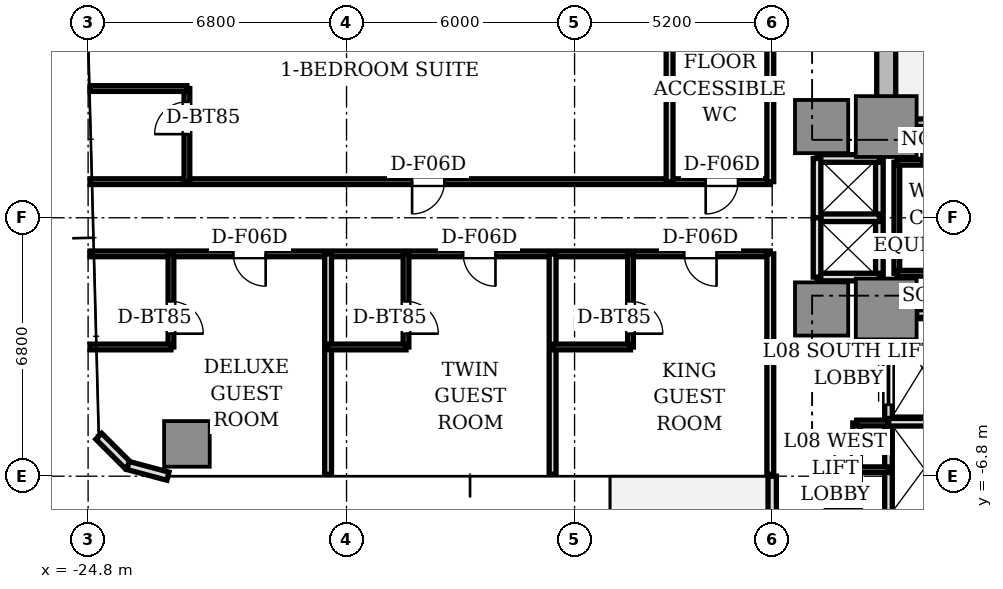
"""IFC4 building model, lengths in metres.
Left out: names, types, materials, properties, quantities, classifications, styles, units other than length and angle.
Written with IfcOpenShell. Run it as: python <this file> out.ifc"""

import sys

from ifc_helpers import new_model, si_unit, direction, frame, frame_2d, origin, origin_2d, place, context, subcontext, project, spatial, rectangle, extrude, source, transform, mapped, element, fill, save


model = new_model("IFC4")
c1 = context("Model", 3, precision=1e-05, world=origin(), true_north=direction((0.0, 1.0)))
c2 = subcontext(c1, "Body", "Model", "MODEL_VIEW")
j1 = project(units=[si_unit("LENGTHUNIT", "METRE"), si_unit("PLANEANGLEUNIT", "RADIAN")], contexts=[c1])
p1 = place(None, origin())
s1 = spatial("IfcSite", under=j1, at=p1, CompositionType="ELEMENT")
p2 = place(p1, origin())
s2 = spatial("IfcBuilding", under=s1, at=p2, CompositionType="ELEMENT")
p3 = place(p2, frame((0.0, 0.0, 33.15)))
s3 = spatial("IfcBuildingStorey", under=s2, at=p3, CompositionType="ELEMENT", Elevation=33.15)
p4 = place(p3, frame((-3.8, 2.85, 0.0), z_axis=(0.0, 0.0, 1.0), x_axis=(0.0, 1.0, 0.0)))
e1 = element("IfcWall", 1, at=p4, inside=s3, PredefinedType="SHEAR", context=c2, shape_type="SweptSolid", body=[
    extrude(rectangle(XDim=6.9, YDim=0.5, at=frame_2d((3.45, 0.0))), origin(), (0.0, 0.0, 1.0), 3.11),
])
m1 = source(origin(), c2, "Body", "SweptSolid", [
    extrude(rectangle(XDim=1.6, YDim=1.6, at=origin_2d()), origin(), (0.0, 0.0, 1.0), 3.11),
])
for number, where, z_axis, x_axis in (
    (2, (-3.8, 2.4, 0.0), (0.0, 0.0, 1.0), (1.0, 0.0, 0.0)),
    (3, (-3.8, -2.4, 0.0), (0.0, 0.0, 1.0), (1.0, 0.0, 0.0)),
):
    element("IfcColumn", number, at=place(p3, frame(where, z_axis=z_axis, x_axis=x_axis)), inside=s3, PredefinedType="COLUMN", context=c2, shape_type="MappedRepresentation", body=[
        mapped(m1, transform((0.0, 0.0, 0.0), scale=1.0)),
    ])
m2 = source(origin(), c2, "Body", "SweptSolid", [
    extrude(rectangle(XDim=1.4, YDim=1.4, at=origin_2d()), origin(), (0.0, 0.0, 1.0), 3.11),
])
for number, where, z_axis, x_axis in (
    (4, (-5.5, 2.4, 0.0), (0.0, 0.0, 1.0), (1.0, 0.0, 0.0)),
    (5, (-5.5, -2.4, 0.0), (0.0, 0.0, 1.0), (1.0, 0.0, 0.0)),
):
    element("IfcColumn", number, at=place(p3, frame(where, z_axis=z_axis, x_axis=x_axis)), inside=s3, PredefinedType="COLUMN", context=c2, shape_type="MappedRepresentation", body=[
        mapped(m2, transform((0.0, 0.0, 0.0), scale=1.0)),
    ])
m3 = source(origin(), c2, "Body", "SweptSolid", [
    extrude(rectangle(XDim=1.2, YDim=1.2, at=origin_2d()), origin(), (0.0, 0.0, 1.0), 3.11),
])
p5 = place(p3, frame((-22.2, -5.95, 0.0), z_axis=(0.0, 0.0, 1.0), x_axis=(1.0, 0.0, 0.0)))
e6 = element("IfcColumn", 6, at=p5, inside=s3, PredefinedType="COLUMN", context=c2, shape_type="MappedRepresentation", body=[
    mapped(m3, transform((0.0, 0.0, 0.0), scale=1.0)),
])
for number, where, z_axis, x_axis in (
    (7, (-24.519, -5.75, 0.0), (0.0, 0.0, 1.0), (0.707, -0.707, 0.0)),
    (8, (-23.75, -6.519, 0.0), (0.0, 0.0, 1.0), (0.966, -0.259, 0.0)),
):
    element("IfcWall", number, at=place(p3, frame(where, z_axis=z_axis, x_axis=x_axis)), inside=s3, PredefinedType="STANDARD", context=c2, shape_type="SweptSolid", body=[
        extrude(rectangle(XDim=1.087, YDim=0.22, at=frame_2d((0.543, 0.0))), origin(), (0.0, 0.0, 1.0), 3.11),
    ])
p6 = place(p3, frame((-6.8, -6.8, 0.0), z_axis=(0.0, 0.0, 1.0), x_axis=(0.0, -1.0, 0.0)))
e9 = element("IfcWall", 9, at=p6, inside=s3, PredefinedType="STANDARD", context=c2, shape_type="SweptSolid", body=[
    extrude(rectangle(XDim=2.7, YDim=0.22, at=frame_2d((1.35, 0.0))), origin(), (0.0, 0.0, 1.0), 3.11),
])
p7 = place(p6, frame((1.4, 0.0, 0.0)))
e10 = element("IfcOpeningElement", 10, at=p7, cuts=e9, PredefinedType="OPENING", context=c2, shape_type="SweptSolid", body=[
    extrude(rectangle(XDim=1.0, YDim=2.2, at=frame_2d((0.5, 1.1))), frame((0.0, 0.12, 0.0), z_axis=(0.0, -1.0, 0.0), x_axis=(1.0, 0.0, 0.0)), (0.0, 0.0, 1.0), 0.24),
])
p8 = place(p3, frame((-3.72, 2.5, 0.0), z_axis=(0.0, 0.0, 1.0), x_axis=(1.0, 0.0, 0.0)))
e11 = element("IfcWall", 11, at=p8, inside=s3, PredefinedType="SOLIDWALL", context=c2, shape_type="SweptSolid", body=[
    extrude(rectangle(XDim=3.72, YDim=0.2, at=frame_2d((1.86, 0.0))), origin(), (0.0, 0.0, 1.0), 3.11),
])
p9 = place(p3, frame((-3.0, -2.52, 0.0), z_axis=(0.0, 0.0, 1.0), x_axis=(1.0, 0.0, 0.0)))
e12 = element("IfcWall", 12, at=p9, inside=s3, PredefinedType="SOLIDWALL", context=c2, shape_type="SweptSolid", body=[
    extrude(rectangle(XDim=1.0, YDim=0.2, at=frame_2d((0.5, 0.0))), origin(), (0.0, 0.0, 1.0), 2.66),
])
p10 = place(p3, frame((-3.74, -5.36, 0.0), z_axis=(0.0, 0.0, 1.0), x_axis=(0.0, 1.0, 0.0)))
e13 = element("IfcWall", 13, at=p10, inside=s3, PredefinedType="SOLIDWALL", context=c2, shape_type="SweptSolid", body=[
    extrude(rectangle(XDim=2.08, YDim=0.2, at=frame_2d((1.04, 0.0))), origin(), (0.0, 0.0, 1.0), 2.66),
])
p11 = place(p10, frame((0.44, 0.0, 0.0)))
e14 = element("IfcOpeningElement", 14, at=p11, cuts=e13, PredefinedType="OPENING", context=c2, shape_type="SweptSolid", body=[
    extrude(rectangle(XDim=1.2, YDim=2.2, at=frame_2d((0.6, 1.1))), frame((0.0, 0.11, 0.0), z_axis=(0.0, -1.0, 0.0), x_axis=(1.0, 0.0, 0.0)), (0.0, 0.0, 1.0), 0.22),
])
p12 = place(p3, frame((-3.74, -7.86, 0.0), z_axis=(0.0, 0.0, 1.0), x_axis=(0.0, 1.0, 0.0)))
e15 = element("IfcWall", 15, at=p12, inside=s3, PredefinedType="SOLIDWALL", context=c2, shape_type="SweptSolid", body=[
    extrude(rectangle(XDim=2.48, YDim=0.2, at=frame_2d((1.24, 0.0))), origin(), (0.0, 0.0, 1.0), 2.66),
])
p13 = place(p3, frame((-3.74, -5.38, 0.0), z_axis=(0.0, 0.0, 1.0), x_axis=(1.0, 0.0, 0.0)))
e16 = element("IfcWall", 16, at=p13, inside=s3, PredefinedType="SOLIDWALL", context=c2, shape_type="SweptSolid", body=[
    extrude(rectangle(XDim=3.69, YDim=0.2, at=frame_2d((1.845, 0.0))), origin(), (0.0, 0.0, 1.0), 2.66),
])
p14 = place(p3, frame((-3.98, -1.56, 0.0), z_axis=(0.0, 0.0, 1.0), x_axis=(0.0, 1.0, 0.0)))
e17 = element("IfcWall", 17, at=p14, inside=s3, PredefinedType="SOLIDWALL", context=c2, shape_type="SweptSolid", body=[
    extrude(rectangle(XDim=3.12, YDim=0.2, at=frame_2d((1.56, 0.0))), origin(), (0.0, 0.0, 1.0), 2.18),
])
for number, where, z_axis, x_axis in (
    (18, (-5.62, 1.56, 0.0), (0.0, 0.0, 1.0), (1.0, 0.0, 0.0)),
    (19, (-5.62, -1.56, 0.0), (0.0, 0.0, 1.0), (1.0, 0.0, 0.0)),
    (20, (-5.62, 0.0, 0.0), (0.0, 0.0, 1.0), (1.0, 0.0, 0.0)),
):
    element("IfcWall", number, at=place(p3, frame(where, z_axis=z_axis, x_axis=x_axis)), inside=s3, PredefinedType="SOLIDWALL", context=c2, shape_type="SweptSolid", body=[
        extrude(rectangle(XDim=1.64, YDim=0.2, at=frame_2d((0.82, 0.0))), origin(), (0.0, 0.0, 1.0), 2.66),
    ])
for number, where, z_axis, x_axis in (
    (21, (-5.62, 0.0, 0.0), (0.0, 0.0, 1.0), (0.0, 1.0, 0.0)),
    (22, (-5.62, -1.56, 0.0), (0.0, 0.0, 1.0), (0.0, 1.0, 0.0)),
):
    element("IfcWall", number, at=place(p3, frame(where, z_axis=z_axis, x_axis=x_axis)), inside=s3, PredefinedType="SOLIDWALL", context=c2, shape_type="SweptSolid", body=[
        extrude(rectangle(XDim=1.56, YDim=0.2, at=frame_2d((0.78, 0.0))), origin(), (0.0, 0.0, 1.0), 2.66),
    ])
p15 = place(p3, frame((-4.58, -7.86, 0.0), z_axis=(0.0, 0.0, 1.0), x_axis=(0.0, 1.0, 0.0)))
e23 = element("IfcWall", 23, at=p15, inside=s3, PredefinedType="SOLIDWALL", context=c2, shape_type="SweptSolid", body=[
    extrude(rectangle(XDim=2.46, YDim=0.2, at=frame_2d((1.23, 0.0))), origin(), (0.0, 0.0, 1.0), 2.66),
])
p16 = place(p15, frame((0.2, 0.0, 0.0)))
e24 = element("IfcOpeningElement", 24, at=p16, cuts=e23, PredefinedType="OPENING", context=c2, shape_type="SweptSolid", body=[
    extrude(rectangle(XDim=0.85, YDim=2.1, at=frame_2d((0.425, 1.05))), frame((0.0, 0.11, 0.0), z_axis=(0.0, -1.0, 0.0), x_axis=(1.0, 0.0, 0.0)), (0.0, 0.0, 1.0), 0.22),
])
p17 = place(p15, frame((1.38, 0.0, 0.0)))
e25 = element("IfcOpeningElement", 25, at=p17, cuts=e23, PredefinedType="OPENING", context=c2, shape_type="SweptSolid", body=[
    extrude(rectangle(XDim=0.85, YDim=2.1, at=frame_2d((0.425, 1.05))), frame((0.0, 0.11, 0.0), z_axis=(0.0, -1.0, 0.0), x_axis=(1.0, 0.0, 0.0)), (0.0, 0.0, 1.0), 0.22),
])
for number, where, z_axis, x_axis in (
    (26, (-4.58, -5.4, 0.0), (0.0, 0.0, 1.0), (1.0, 0.0, 0.0)),
    (27, (-4.58, -6.63, 0.0), (0.0, 0.0, 1.0), (1.0, 0.0, 0.0)),
):
    element("IfcWall", number, at=place(p3, frame(where, z_axis=z_axis, x_axis=x_axis)), inside=s3, PredefinedType="PARTITIONING", context=c2, shape_type="SweptSolid", body=[
        extrude(rectangle(XDim=0.84, YDim=0.15, at=frame_2d((0.42, 0.0))), origin(), (0.0, 0.0, 1.0), 2.66),
    ])
p18 = place(p3, frame((-3.52, -1.46, 0.0), z_axis=(0.0, 0.0, 1.0), x_axis=(0.0, 1.0, 0.0)))
e28 = element("IfcWall", 28, at=p18, inside=s3, PredefinedType="PARTITIONING", context=c2, shape_type="SweptSolid", body=[
    extrude(rectangle(XDim=2.92, YDim=0.15, at=frame_2d((1.46, 0.0))), origin(), (0.0, 0.0, 1.0), 2.18),
])
p19 = place(p3, frame((-3.52, 1.46, 0.0), z_axis=(0.0, 0.0, 1.0), x_axis=(1.0, 0.0, 0.0)))
e29 = element("IfcWall", 29, at=p19, inside=s3, PredefinedType="PARTITIONING", context=c2, shape_type="SweptSolid", body=[
    extrude(rectangle(XDim=2.2, YDim=0.15, at=frame_2d((1.1, 0.0))), origin(), (0.0, 0.0, 1.0), 2.66),
])
p20 = place(p19, frame((0.65, 0.0, 0.0)))
e30 = element("IfcOpeningElement", 30, at=p20, cuts=e29, PredefinedType="OPENING", context=c2, shape_type="SweptSolid", body=[
    extrude(rectangle(XDim=0.85, YDim=2.1, at=frame_2d((0.425, 1.05))), frame((0.0, 0.085, 0.0), z_axis=(0.0, -1.0, 0.0), x_axis=(1.0, 0.0, 0.0)), (0.0, 0.0, 1.0), 0.17),
])
p21 = place(p3, frame((-3.52, -1.46, 0.0), z_axis=(0.0, 0.0, 1.0), x_axis=(1.0, 0.0, 0.0)))
e31 = element("IfcWall", 31, at=p21, inside=s3, PredefinedType="PARTITIONING", context=c2, shape_type="SweptSolid", body=[
    extrude(rectangle(XDim=2.2, YDim=0.15, at=frame_2d((1.1, 0.0))), origin(), (0.0, 0.0, 1.0), 2.66),
])
p22 = place(p3, frame((-6.85, -0.95, 0.0), z_axis=(0.0, 0.0, 1.0), x_axis=(-1.0, 0.0, 0.0)))
e32 = element("IfcWall", 32, at=p22, inside=s3, PredefinedType="PARTITIONING", context=c2, shape_type="SweptSolid", body=[
    extrude(rectangle(XDim=17.9, YDim=0.15, at=frame_2d((8.95, 0.0))), origin(), (0.0, 0.0, 1.0), 2.66),
])
p23 = place(p22, frame((1.414, 0.0, 0.0)))
e33 = element("IfcOpeningElement", 33, at=p23, cuts=e32, PredefinedType="OPENING", context=c2, shape_type="SweptSolid", body=[
    extrude(rectangle(XDim=0.85, YDim=2.1, at=frame_2d((0.425, 1.05))), frame((0.0, 0.085, 0.0), z_axis=(0.0, -1.0, 0.0), x_axis=(1.0, 0.0, 0.0)), (0.0, 0.0, 1.0), 0.17),
])
p24 = place(p22, frame((7.231, 0.0, 0.0)))
e34 = element("IfcOpeningElement", 34, at=p24, cuts=e32, PredefinedType="OPENING", context=c2, shape_type="SweptSolid", body=[
    extrude(rectangle(XDim=0.85, YDim=2.1, at=frame_2d((0.425, 1.05))), frame((0.0, 0.085, 0.0), z_axis=(0.0, -1.0, 0.0), x_axis=(1.0, 0.0, 0.0)), (0.0, 0.0, 1.0), 0.17),
])
p25 = place(p22, frame((13.278, 0.0, 0.0)))
e35 = element("IfcOpeningElement", 35, at=p25, cuts=e32, PredefinedType="OPENING", context=c2, shape_type="SweptSolid", body=[
    extrude(rectangle(XDim=0.85, YDim=2.1, at=frame_2d((0.425, 1.05))), frame((0.0, 0.085, 0.0), z_axis=(0.0, -1.0, 0.0), x_axis=(1.0, 0.0, 0.0)), (0.0, 0.0, 1.0), 0.17),
])
p26 = place(p3, frame((-6.85, 0.95, 0.0), z_axis=(0.0, 0.0, 1.0), x_axis=(-1.0, 0.0, 0.0)))
e36 = element("IfcWall", 36, at=p26, inside=s3, PredefinedType="PARTITIONING", context=c2, shape_type="SweptSolid", body=[
    extrude(rectangle(XDim=17.9, YDim=0.15, at=frame_2d((8.95, 0.0))), origin(), (0.0, 0.0, 1.0), 2.66),
])
p27 = place(p26, frame((0.85, 0.0, 0.0)))
e37 = element("IfcOpeningElement", 37, at=p27, cuts=e36, PredefinedType="OPENING", context=c2, shape_type="SweptSolid", body=[
    extrude(rectangle(XDim=0.85, YDim=2.1, at=frame_2d((0.425, 1.05))), frame((0.0, 0.085, 0.0), z_axis=(0.0, -1.0, 0.0), x_axis=(1.0, 0.0, 0.0)), (0.0, 0.0, 1.0), 0.17),
])
p28 = place(p26, frame((8.575, 0.0, 0.0)))
e38 = element("IfcOpeningElement", 38, at=p28, cuts=e36, PredefinedType="OPENING", context=c2, shape_type="SweptSolid", body=[
    extrude(rectangle(XDim=0.85, YDim=2.1, at=frame_2d((0.425, 1.05))), frame((0.0, 0.085, 0.0), z_axis=(0.0, -1.0, 0.0), x_axis=(1.0, 0.0, 0.0)), (0.0, 0.0, 1.0), 0.17),
])
for number, where, z_axis, x_axis in (
    (39, (-6.85, -0.95, 0.0), (0.0, 0.0, 1.0), (0.0, -1.0, 0.0)),
    (40, (-6.85, 6.75, 0.0), (0.0, 0.0, 1.0), (0.0, -1.0, 0.0)),
    (41, (-12.578, -0.95, 0.0), (0.0, 0.0, 1.0), (0.0, -1.0, 0.0)),
):
    element("IfcWall", number, at=place(p3, frame(where, z_axis=z_axis, x_axis=x_axis)), inside=s3, PredefinedType="PARTITIONING", context=c2, shape_type="SweptSolid", body=[
        extrude(rectangle(XDim=5.8, YDim=0.18, at=frame_2d((2.9, 0.0))), origin(), (0.0, 0.0, 1.0), 2.66),
    ])
p29 = place(p3, frame((-10.528, -0.95, 0.0), z_axis=(0.0, 0.0, 1.0), x_axis=(0.0, -1.0, 0.0)))
e42 = element("IfcWall", 42, at=p29, inside=s3, PredefinedType="PARTITIONING", context=c2, shape_type="SweptSolid", body=[
    extrude(rectangle(XDim=2.45, YDim=0.15, at=frame_2d((1.225, 0.0))), origin(), (0.0, 0.0, 1.0), 2.66),
])
p30 = place(p29, frame((1.25, 0.0, 0.0)))
e43 = element("IfcOpeningElement", 43, at=p30, cuts=e42, PredefinedType="OPENING", context=c2, shape_type="SweptSolid", body=[
    extrude(rectangle(XDim=0.85, YDim=2.1, at=frame_2d((0.425, 1.05))), frame((0.0, 0.085, 0.0), z_axis=(0.0, -1.0, 0.0), x_axis=(1.0, 0.0, 0.0)), (0.0, 0.0, 1.0), 0.17),
])
p31 = place(p3, frame((-10.528, -3.4, 0.0), z_axis=(0.0, 0.0, 1.0), x_axis=(-1.0, 0.0, 0.0)))
e44 = element("IfcWall", 44, at=p31, inside=s3, PredefinedType="PARTITIONING", context=c2, shape_type="SweptSolid", body=[
    extrude(rectangle(XDim=2.05, YDim=0.15, at=frame_2d((1.025, 0.0))), origin(), (0.0, 0.0, 1.0), 2.63),
])
p32 = place(p3, frame((-18.485, -0.95, 0.0), z_axis=(0.0, 0.0, 1.0), x_axis=(0.0, -1.0, 0.0)))
e45 = element("IfcWall", 45, at=p32, inside=s3, PredefinedType="PARTITIONING", context=c2, shape_type="SweptSolid", body=[
    extrude(rectangle(XDim=5.8, YDim=0.18, at=frame_2d((2.9, 0.0))), origin(), (0.0, 0.0, 1.0), 2.66),
])
p33 = place(p3, frame((-16.435, -0.95, 0.0), z_axis=(0.0, 0.0, 1.0), x_axis=(0.0, -1.0, 0.0)))
e46 = element("IfcWall", 46, at=p33, inside=s3, PredefinedType="PARTITIONING", context=c2, shape_type="SweptSolid", body=[
    extrude(rectangle(XDim=2.45, YDim=0.15, at=frame_2d((1.225, 0.0))), origin(), (0.0, 0.0, 1.0), 2.66),
])
p34 = place(p33, frame((1.25, 0.0, 0.0)))
e47 = element("IfcOpeningElement", 47, at=p34, cuts=e46, PredefinedType="OPENING", context=c2, shape_type="SweptSolid", body=[
    extrude(rectangle(XDim=0.85, YDim=2.1, at=frame_2d((0.425, 1.05))), frame((0.0, 0.085, 0.0), z_axis=(0.0, -1.0, 0.0), x_axis=(1.0, 0.0, 0.0)), (0.0, 0.0, 1.0), 0.17),
])
p35 = place(p3, frame((-16.435, -3.4, 0.0), z_axis=(0.0, 0.0, 1.0), x_axis=(-1.0, 0.0, 0.0)))
e48 = element("IfcWall", 48, at=p35, inside=s3, PredefinedType="PARTITIONING", context=c2, shape_type="SweptSolid", body=[
    extrude(rectangle(XDim=2.05, YDim=0.15, at=frame_2d((1.025, 0.0))), origin(), (0.0, 0.0, 1.0), 2.63),
])
p36 = place(p3, frame((-22.62, -0.95, 0.0), z_axis=(0.0, 0.0, 1.0), x_axis=(0.0, -1.0, 0.0)))
e49 = element("IfcWall", 49, at=p36, inside=s3, PredefinedType="PARTITIONING", context=c2, shape_type="SweptSolid", body=[
    extrude(rectangle(XDim=2.45, YDim=0.15, at=frame_2d((1.225, 0.0))), origin(), (0.0, 0.0, 1.0), 2.66),
])
p37 = place(p36, frame((1.25, 0.0, 0.0)))
e50 = element("IfcOpeningElement", 50, at=p37, cuts=e49, PredefinedType="OPENING", context=c2, shape_type="SweptSolid", body=[
    extrude(rectangle(XDim=0.85, YDim=2.1, at=frame_2d((0.425, 1.05))), frame((0.0, 0.085, 0.0), z_axis=(0.0, -1.0, 0.0), x_axis=(1.0, 0.0, 0.0)), (0.0, 0.0, 1.0), 0.17),
])
p38 = place(p3, frame((-22.62, -3.4, 0.0), z_axis=(0.0, 0.0, 1.0), x_axis=(-1.0, 0.0, 0.0)))
e51 = element("IfcWall", 51, at=p38, inside=s3, PredefinedType="PARTITIONING", context=c2, shape_type="SweptSolid", body=[
    extrude(rectangle(XDim=2.13, YDim=0.15, at=frame_2d((1.065, 0.0))), origin(), (0.0, 0.0, 1.0), 2.66),
])
p39 = place(p3, frame((-9.5, 0.95, 0.0), z_axis=(0.0, 0.0, 1.0), x_axis=(0.0, 1.0, 0.0)))
e52 = element("IfcWall", 52, at=p39, inside=s3, PredefinedType="PARTITIONING", context=c2, shape_type="SweptSolid", body=[
    extrude(rectangle(XDim=5.8, YDim=0.18, at=frame_2d((2.9, 0.0))), origin(), (0.0, 0.0, 1.0), 2.66),
])
p40 = place(p3, frame((-22.2, 0.95, 0.0), z_axis=(0.0, 0.0, 1.0), x_axis=(0.0, 1.0, 0.0)))
e53 = element("IfcWall", 53, at=p40, inside=s3, PredefinedType="PARTITIONING", context=c2, shape_type="SweptSolid", body=[
    extrude(rectangle(XDim=2.45, YDim=0.15, at=frame_2d((1.225, 0.0))), origin(), (0.0, 0.0, 1.0), 2.58),
])
p41 = place(p40, frame((1.25, 0.0, 0.0)))
e54 = element("IfcOpeningElement", 54, at=p41, cuts=e53, PredefinedType="OPENING", context=c2, shape_type="SweptSolid", body=[
    extrude(rectangle(XDim=0.85, YDim=2.1, at=frame_2d((0.425, 1.05))), frame((0.0, 0.085, 0.0), z_axis=(0.0, -1.0, 0.0), x_axis=(1.0, 0.0, 0.0)), (0.0, 0.0, 1.0), 0.17),
])
p42 = place(p3, frame((-22.2, 3.4, 0.0), z_axis=(0.0, 0.0, 1.0), x_axis=(-1.0, 0.0, 0.0)))
e55 = element("IfcWall", 55, at=p42, inside=s3, PredefinedType="PARTITIONING", context=c2, shape_type="SweptSolid", body=[
    extrude(rectangle(XDim=2.55, YDim=0.15, at=frame_2d((1.275, 0.0))), origin(), (0.0, 0.0, 1.0), 2.66),
])
m4 = source(origin(), c2, "Body", "SweptSolid", [
    extrude(rectangle(XDim=1.2, YDim=0.05, at=origin_2d()), origin(), (0.0, 0.0, 1.0), 2.2),
])
p43 = place(p11, frame((0.6, 0.0, 0.0)))
e56 = element("IfcDoor", 56, at=p43, inside=s3, OperationType="DOUBLE_DOOR_SLIDING", PredefinedType="DOOR", context=c2, shape_type="MappedRepresentation", body=[
    mapped(m4, transform((0.0, 0.0, 0.0), scale=1.0)),
])
fill(e14, e56)
m5 = source(origin(), c2, "Body", "SweptSolid", [
    extrude(rectangle(XDim=0.85, YDim=0.05, at=origin_2d()), origin(), (0.0, 0.0, 1.0), 2.1),
])
p44 = place(p16, frame((0.425, 0.0, 0.0)))
e57 = element("IfcDoor", 57, at=p44, inside=s3, OperationType="SINGLE_SWING_LEFT", PredefinedType="DOOR", context=c2, shape_type="MappedRepresentation", body=[
    mapped(m5, transform((0.0, 0.0, 0.0), scale=1.0)),
])
fill(e24, e57)
p45 = place(p17, frame((0.425, 0.0, 0.0)))
e58 = element("IfcDoor", 58, at=p45, inside=s3, OperationType="SINGLE_SWING_RIGHT", PredefinedType="DOOR", context=c2, shape_type="MappedRepresentation", body=[
    mapped(m5, transform((0.0, 0.0, 0.0), scale=1.0)),
])
fill(e25, e58)
p46 = place(p20, frame((0.425, 0.0, 0.0)))
e59 = element("IfcDoor", 59, at=p46, inside=s3, OperationType="SINGLE_SWING_LEFT", PredefinedType="DOOR", context=c2, shape_type="MappedRepresentation", body=[
    mapped(m5, transform((0.0, 0.0, 0.0), scale=1.0)),
])
fill(e30, e59)
p47 = place(p30, frame((0.425, 0.0, 0.0)))
e60 = element("IfcDoor", 60, at=p47, inside=s3, OperationType="SINGLE_SWING_RIGHT", PredefinedType="DOOR", context=c2, shape_type="MappedRepresentation", body=[
    mapped(m5, transform((0.0, 0.0, 0.0), scale=1.0)),
])
fill(e43, e60)
p48 = place(p23, frame((0.425, 0.0, 0.0)))
e61 = element("IfcDoor", 61, at=p48, inside=s3, OperationType="SINGLE_SWING_LEFT", PredefinedType="DOOR", context=c2, shape_type="MappedRepresentation", body=[
    mapped(m5, transform((0.0, 0.0, 0.0), scale=1.0)),
])
fill(e33, e61)
p49 = place(p34, frame((0.425, 0.0, 0.0)))
e62 = element("IfcDoor", 62, at=p49, inside=s3, OperationType="SINGLE_SWING_RIGHT", PredefinedType="DOOR", context=c2, shape_type="MappedRepresentation", body=[
    mapped(m5, transform((0.0, 0.0, 0.0), scale=1.0)),
])
fill(e47, e62)
p50 = place(p24, frame((0.425, 0.0, 0.0)))
e63 = element("IfcDoor", 63, at=p50, inside=s3, OperationType="SINGLE_SWING_LEFT", PredefinedType="DOOR", context=c2, shape_type="MappedRepresentation", body=[
    mapped(m5, transform((0.0, 0.0, 0.0), scale=1.0)),
])
fill(e34, e63)
p51 = place(p37, frame((0.425, 0.0, 0.0)))
e64 = element("IfcDoor", 64, at=p51, inside=s3, OperationType="SINGLE_SWING_RIGHT", PredefinedType="DOOR", context=c2, shape_type="MappedRepresentation", body=[
    mapped(m5, transform((0.0, 0.0, 0.0), scale=1.0)),
])
fill(e50, e64)
p52 = place(p25, frame((0.425, 0.0, 0.0)))
e65 = element("IfcDoor", 65, at=p52, inside=s3, OperationType="SINGLE_SWING_LEFT", PredefinedType="DOOR", context=c2, shape_type="MappedRepresentation", body=[
    mapped(m5, transform((0.0, 0.0, 0.0), scale=1.0)),
])
fill(e35, e65)
p53 = place(p27, frame((0.425, 0.0, 0.0)))
e66 = element("IfcDoor", 66, at=p53, inside=s3, OperationType="SINGLE_SWING_RIGHT", PredefinedType="DOOR", context=c2, shape_type="MappedRepresentation", body=[
    mapped(m5, transform((0.0, 0.0, 0.0), scale=1.0)),
])
fill(e37, e66)
p54 = place(p41, frame((0.425, 0.0, 0.0)))
e67 = element("IfcDoor", 67, at=p54, inside=s3, OperationType="SINGLE_SWING_LEFT", PredefinedType="DOOR", context=c2, shape_type="MappedRepresentation", body=[
    mapped(m5, transform((0.0, 0.0, 0.0), scale=1.0)),
])
fill(e54, e67)
p55 = place(p28, frame((0.425, 0.0, 0.0)))
e68 = element("IfcDoor", 68, at=p55, inside=s3, OperationType="SINGLE_SWING_RIGHT", PredefinedType="DOOR", context=c2, shape_type="MappedRepresentation", body=[
    mapped(m5, transform((0.0, 0.0, 0.0), scale=1.0)),
])
fill(e38, e68)
save(model, sys.argv[1])
